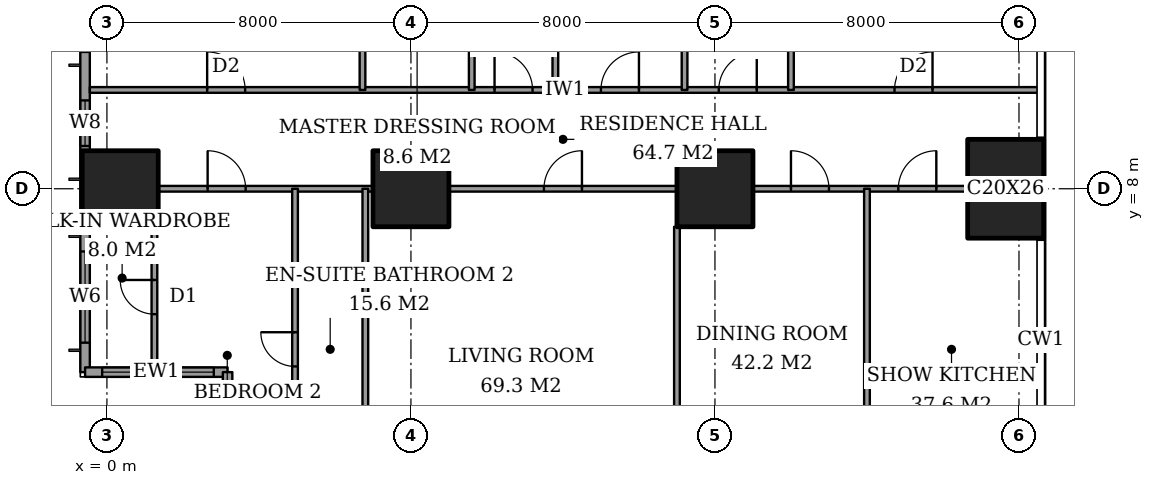
"""IFC4 building model, lengths in metres.
Left out: names, types, materials, properties, quantities, classifications, styles, units other than length and angle.
Written with IfcOpenShell. Run it as: python <this file> out.ifc"""

import sys

from ifc_helpers import new_model, si_unit, direction, frame, frame_2d, origin, origin_2d, place, context, subcontext, project, spatial, rectangle, extrude, element, fill, save


model = new_model("IFC4")
c1 = context("Model", 3, precision=1e-05, world=origin(), true_north=direction((0.0, 1.0)))
c2 = subcontext(c1, "Body", "Model", "MODEL_VIEW")
j1 = project(units=[si_unit("LENGTHUNIT", "METRE"), si_unit("PLANEANGLEUNIT", "RADIAN")], contexts=[c1])
p1 = place(None, origin())
s1 = spatial("IfcSite", under=j1, at=p1, CompositionType="ELEMENT")
p2 = place(p1, origin())
s2 = spatial("IfcBuilding", under=s1, at=p2, CompositionType="ELEMENT")
p3 = place(p2, frame((0.0, 0.0, 87.2)))
s3 = spatial("IfcBuildingStorey", under=s2, at=p3, CompositionType="ELEMENT", Elevation=87.2)
for number, where, z_axis, x_axis in (
    (1, (0.35, 8.0, 0.0), (0.0, 0.0, 1.0), (1.0, 0.0, 0.0)),
    (2, (8.0, 8.0, 0.0), (0.0, 0.0, 1.0), (1.0, 0.0, 0.0)),
    (3, (16.0, 8.0, 0.0), (0.0, 0.0, 1.0), (1.0, 0.0, 0.0)),
):
    element("IfcColumn", number, at=place(p3, frame(where, z_axis=z_axis, x_axis=x_axis)), inside=s3, PredefinedType="COLUMN", context=c2, shape_type="SweptSolid", body=[
        extrude(rectangle(XDim=2.0, YDim=2.0, at=origin_2d()), origin(), (0.0, 0.0, 1.0), 3.6),
    ])
p4 = place(p3, frame((23.65, 8.0, 0.0), z_axis=(0.0, 0.0, 1.0), x_axis=(1.0, 0.0, 0.0)))
e4 = element("IfcColumn", 4, at=p4, inside=s3, PredefinedType="COLUMN", context=c2, shape_type="SweptSolid", body=[
    extrude(rectangle(XDim=2.0, YDim=2.6, at=origin_2d()), origin(), (0.0, 0.0, 1.0), 3.6),
])
p5 = place(p3, frame((-0.575, 44.825, 0.0), z_axis=(0.0, 0.0, 1.0), x_axis=(0.0, -1.0, 0.0)))
e5 = element("IfcWall", 5, at=p5, inside=s3, PredefinedType="SOLIDWALL", context=c2, shape_type="SweptSolid", body=[
    extrude(rectangle(XDim=41.65, YDim=0.25, at=frame_2d((20.825, 0.0))), origin(), (0.0, 0.0, 1.0), 3.6),
])
p6 = place(p5, frame((0.775, 0.0, 0.6)))
e6 = element("IfcOpeningElement", 6, at=p6, cuts=e5, PredefinedType="OPENING", context=c2, shape_type="SweptSolid", body=[
    extrude(rectangle(XDim=2.4, YDim=2.0, at=frame_2d((1.2, 1.0))), frame((0.0, 0.135, 0.0), z_axis=(0.0, -1.0, 0.0), x_axis=(1.0, 0.0, 0.0)), (0.0, 0.0, 1.0), 0.27),
])
p7 = place(p5, frame((6.1, 0.0, 0.6)))
e7 = element("IfcOpeningElement", 7, at=p7, cuts=e5, PredefinedType="OPENING", context=c2, shape_type="SweptSolid", body=[
    extrude(rectangle(XDim=1.2, YDim=2.0, at=frame_2d((0.6, 1.0))), frame((0.0, 0.135, 0.0), z_axis=(0.0, -1.0, 0.0), x_axis=(1.0, 0.0, 0.0)), (0.0, 0.0, 1.0), 0.27),
])
p8 = place(p5, frame((8.425, 0.0, 0.6)))
e8 = element("IfcOpeningElement", 8, at=p8, cuts=e5, PredefinedType="OPENING", context=c2, shape_type="SweptSolid", body=[
    extrude(rectangle(XDim=2.4, YDim=2.0, at=frame_2d((1.2, 1.0))), frame((0.0, 0.135, 0.0), z_axis=(0.0, -1.0, 0.0), x_axis=(1.0, 0.0, 0.0)), (0.0, 0.0, 1.0), 0.27),
])
p9 = place(p5, frame((15.625, 0.0, 0.6)))
e9 = element("IfcOpeningElement", 9, at=p9, cuts=e5, PredefinedType="OPENING", context=c2, shape_type="SweptSolid", body=[
    extrude(rectangle(XDim=2.4, YDim=2.0, at=frame_2d((1.2, 1.0))), frame((0.0, 0.135, 0.0), z_axis=(0.0, -1.0, 0.0), x_axis=(1.0, 0.0, 0.0)), (0.0, 0.0, 1.0), 0.27),
])
p10 = place(p5, frame((23.625, 0.0, 0.6)))
e10 = element("IfcOpeningElement", 10, at=p10, cuts=e5, PredefinedType="OPENING", context=c2, shape_type="SweptSolid", body=[
    extrude(rectangle(XDim=2.4, YDim=2.0, at=frame_2d((1.2, 1.0))), frame((0.0, 0.135, 0.0), z_axis=(0.0, -1.0, 0.0), x_axis=(1.0, 0.0, 0.0)), (0.0, 0.0, 1.0), 0.27),
])
p11 = place(p5, frame((30.825, 0.0, 0.6)))
e11 = element("IfcOpeningElement", 11, at=p11, cuts=e5, PredefinedType="OPENING", context=c2, shape_type="SweptSolid", body=[
    extrude(rectangle(XDim=2.4, YDim=2.0, at=frame_2d((1.2, 1.0))), frame((0.0, 0.135, 0.0), z_axis=(0.0, -1.0, 0.0), x_axis=(1.0, 0.0, 0.0)), (0.0, 0.0, 1.0), 0.27),
])
p12 = place(p5, frame((34.5, 0.0, 0.6)))
e12 = element("IfcOpeningElement", 12, at=p12, cuts=e5, PredefinedType="OPENING", context=c2, shape_type="SweptSolid", body=[
    extrude(rectangle(XDim=1.2, YDim=2.0, at=frame_2d((0.6, 1.0))), frame((0.0, 0.135, 0.0), z_axis=(0.0, -1.0, 0.0), x_axis=(1.0, 0.0, 0.0)), (0.0, 0.0, 1.0), 0.27),
])
p13 = place(p5, frame((38.475, 0.0, 0.6)))
e13 = element("IfcOpeningElement", 13, at=p13, cuts=e5, PredefinedType="OPENING", context=c2, shape_type="SweptSolid", body=[
    extrude(rectangle(XDim=2.4, YDim=2.0, at=frame_2d((1.2, 1.0))), frame((0.0, 0.135, 0.0), z_axis=(0.0, -1.0, 0.0), x_axis=(1.0, 0.0, 0.0)), (0.0, 0.0, 1.0), 0.27),
])
p14 = place(p3, frame((-0.575, 3.175, 0.0), z_axis=(0.0, 0.0, 1.0), x_axis=(1.0, 0.0, 0.0)))
e14 = element("IfcWall", 14, at=p14, inside=s3, PredefinedType="SOLIDWALL", context=c2, shape_type="SweptSolid", body=[
    extrude(rectangle(XDim=3.75, YDim=0.25, at=frame_2d((1.875, 0.0))), origin(), (0.0, 0.0, 1.0), 3.6),
])
p15 = place(p14, frame((0.45, 0.0, 0.6)))
e15 = element("IfcOpeningElement", 15, at=p15, cuts=e14, PredefinedType="OPENING", context=c2, shape_type="SweptSolid", body=[
    extrude(rectangle(XDim=1.2, YDim=2.0, at=frame_2d((0.6, 1.0))), frame((0.0, 0.135, 0.0), z_axis=(0.0, -1.0, 0.0), x_axis=(1.0, 0.0, 0.0)), (0.0, 0.0, 1.0), 0.27),
])
p16 = place(p14, frame((2.188, 0.0, 0.6)))
e16 = element("IfcOpeningElement", 16, at=p16, cuts=e14, PredefinedType="OPENING", context=c2, shape_type="SweptSolid", body=[
    extrude(rectangle(XDim=1.2, YDim=2.0, at=frame_2d((0.6, 1.0))), frame((0.0, 0.135, 0.0), z_axis=(0.0, -1.0, 0.0), x_axis=(1.0, 0.0, 0.0)), (0.0, 0.0, 1.0), 0.27),
])
p17 = place(p3, frame((3.175, 3.175, 0.0), z_axis=(0.0, 0.0, 1.0), x_axis=(0.0, -1.0, 0.0)))
e17 = element("IfcWall", 17, at=p17, inside=s3, PredefinedType="SOLIDWALL", context=c2, shape_type="SweptSolid", body=[
    extrude(rectangle(XDim=3.75, YDim=0.25, at=frame_2d((1.875, 0.0))), origin(), (0.0, 0.0, 1.0), 3.6),
])
p18 = place(p17, frame((0.613, 0.0, 0.6)))
e18 = element("IfcOpeningElement", 18, at=p18, cuts=e17, PredefinedType="OPENING", context=c2, shape_type="SweptSolid", body=[
    extrude(rectangle(XDim=2.4, YDim=2.0, at=frame_2d((1.2, 1.0))), frame((0.0, 0.135, 0.0), z_axis=(0.0, -1.0, 0.0), x_axis=(1.0, 0.0, 0.0)), (0.0, 0.0, 1.0), 0.27),
])
p19 = place(p3, frame((1.35, 8.0, 0.0), z_axis=(0.0, 0.0, 1.0), x_axis=(1.0, 0.0, 0.0)))
e19 = element("IfcWall", 19, at=p19, inside=s3, PredefinedType="PARTITIONING", context=c2, shape_type="SweptSolid", body=[
    extrude(rectangle(XDim=5.65, YDim=0.15, at=frame_2d((2.825, 0.0))), origin(), (0.0, 0.0, 1.0), 3.25),
])
p20 = place(p19, frame((1.3, 0.0, 0.0)))
e20 = element("IfcOpeningElement", 20, at=p20, cuts=e19, PredefinedType="OPENING", context=c2, shape_type="SweptSolid", body=[
    extrude(rectangle(XDim=1.0, YDim=2.1, at=frame_2d((0.5, 1.05))), frame((0.0, 0.085, 0.0), z_axis=(0.0, -1.0, 0.0), x_axis=(1.0, 0.0, 0.0)), (0.0, 0.0, 1.0), 0.17),
])
p21 = place(p3, frame((9.0, 8.0, 0.0), z_axis=(0.0, 0.0, 1.0), x_axis=(1.0, 0.0, 0.0)))
e21 = element("IfcWall", 21, at=p21, inside=s3, PredefinedType="PARTITIONING", context=c2, shape_type="SweptSolid", body=[
    extrude(rectangle(XDim=6.0, YDim=0.15, at=frame_2d((3.0, 0.0))), origin(), (0.0, 0.0, 1.0), 3.25),
])
p22 = place(p21, frame((2.5, 0.0, 0.0)))
e22 = element("IfcOpeningElement", 22, at=p22, cuts=e21, PredefinedType="OPENING", context=c2, shape_type="SweptSolid", body=[
    extrude(rectangle(XDim=1.0, YDim=2.1, at=frame_2d((0.5, 1.05))), frame((0.0, 0.085, 0.0), z_axis=(0.0, -1.0, 0.0), x_axis=(1.0, 0.0, 0.0)), (0.0, 0.0, 1.0), 0.17),
])
p23 = place(p3, frame((17.0, 8.0, 0.0), z_axis=(0.0, 0.0, 1.0), x_axis=(1.0, 0.0, 0.0)))
e23 = element("IfcWall", 23, at=p23, inside=s3, PredefinedType="PARTITIONING", context=c2, shape_type="SweptSolid", body=[
    extrude(rectangle(XDim=5.65, YDim=0.15, at=frame_2d((2.825, 0.0))), origin(), (0.0, 0.0, 1.0), 3.25),
])
p24 = place(p23, frame((1.0, 0.0, 0.0)))
e24 = element("IfcOpeningElement", 24, at=p24, cuts=e23, PredefinedType="OPENING", context=c2, shape_type="SweptSolid", body=[
    extrude(rectangle(XDim=1.0, YDim=2.1, at=frame_2d((0.5, 1.05))), frame((0.0, 0.085, 0.0), z_axis=(0.0, -1.0, 0.0), x_axis=(1.0, 0.0, 0.0)), (0.0, 0.0, 1.0), 0.17),
])
p25 = place(p23, frame((3.825, 0.0, 0.0)))
e25 = element("IfcOpeningElement", 25, at=p25, cuts=e23, PredefinedType="OPENING", context=c2, shape_type="SweptSolid", body=[
    extrude(rectangle(XDim=1.0, YDim=2.1, at=frame_2d((0.5, 1.05))), frame((0.0, 0.085, 0.0), z_axis=(0.0, -1.0, 0.0), x_axis=(1.0, 0.0, 0.0)), (0.0, 0.0, 1.0), 0.17),
])
p26 = place(p3, frame((-0.45, 10.6, 0.0), z_axis=(0.0, 0.0, 1.0), x_axis=(1.0, 0.0, 0.0)))
e26 = element("IfcWall", 26, at=p26, inside=s3, PredefinedType="PARTITIONING", context=c2, shape_type="SweptSolid", body=[
    extrude(rectangle(XDim=25.011, YDim=0.15, at=frame_2d((12.505, 0.0))), origin(), (0.0, 0.0, 1.0), 3.25),
])
p27 = place(p26, frame((10.65, 0.0, 0.0)))
e27 = element("IfcOpeningElement", 27, at=p27, cuts=e26, PredefinedType="OPENING", context=c2, shape_type="SweptSolid", body=[
    extrude(rectangle(XDim=1.0, YDim=2.1, at=frame_2d((0.5, 1.05))), frame((0.0, 0.085, 0.0), z_axis=(0.0, -1.0, 0.0), x_axis=(1.0, 0.0, 0.0)), (0.0, 0.0, 1.0), 0.17),
])
p28 = place(p26, frame((3.087, 0.0, 0.0)))
e28 = element("IfcOpeningElement", 28, at=p28, cuts=e26, PredefinedType="OPENING", context=c2, shape_type="SweptSolid", body=[
    extrude(rectangle(XDim=1.0, YDim=2.1, at=frame_2d((0.5, 1.05))), frame((0.0, 0.085, 0.0), z_axis=(0.0, -1.0, 0.0), x_axis=(1.0, 0.0, 0.0)), (0.0, 0.0, 1.0), 0.17),
])
p29 = place(p26, frame((13.45, 0.0, 0.0)))
e29 = element("IfcOpeningElement", 29, at=p29, cuts=e26, PredefinedType="OPENING", context=c2, shape_type="SweptSolid", body=[
    extrude(rectangle(XDim=1.0, YDim=2.1, at=frame_2d((0.5, 1.05))), frame((0.0, 0.085, 0.0), z_axis=(0.0, -1.0, 0.0), x_axis=(1.0, 0.0, 0.0)), (0.0, 0.0, 1.0), 0.17),
])
p30 = place(p26, frame((16.55, 0.0, 0.0)))
e30 = element("IfcOpeningElement", 30, at=p30, cuts=e26, PredefinedType="OPENING", context=c2, shape_type="SweptSolid", body=[
    extrude(rectangle(XDim=1.0, YDim=2.1, at=frame_2d((0.5, 1.05))), frame((0.0, 0.085, 0.0), z_axis=(0.0, -1.0, 0.0), x_axis=(1.0, 0.0, 0.0)), (0.0, 0.0, 1.0), 0.17),
])
p31 = place(p26, frame((21.175, 0.0, 0.0)))
e31 = element("IfcOpeningElement", 31, at=p31, cuts=e26, PredefinedType="OPENING", context=c2, shape_type="SweptSolid", body=[
    extrude(rectangle(XDim=1.0, YDim=2.1, at=frame_2d((0.5, 1.05))), frame((0.0, 0.085, 0.0), z_axis=(0.0, -1.0, 0.0), x_axis=(1.0, 0.0, 0.0)), (0.0, 0.0, 1.0), 0.17),
])
p32 = place(p3, frame((1.25, 3.3, 0.0), z_axis=(0.0, 0.0, 1.0), x_axis=(0.0, 1.0, 0.0)))
e32 = element("IfcWall", 32, at=p32, inside=s3, PredefinedType="PARTITIONING", context=c2, shape_type="SweptSolid", body=[
    extrude(rectangle(XDim=3.7, YDim=0.15, at=frame_2d((1.85, 0.0))), origin(), (0.0, 0.0, 1.0), 3.25),
])
p33 = place(p32, frame((1.4, 0.0, 0.0)))
e33 = element("IfcOpeningElement", 33, at=p33, cuts=e32, PredefinedType="OPENING", context=c2, shape_type="SweptSolid", body=[
    extrude(rectangle(XDim=0.9, YDim=2.1, at=frame_2d((0.45, 1.05))), frame((0.0, 0.085, 0.0), z_axis=(0.0, -1.0, 0.0), x_axis=(1.0, 0.0, 0.0)), (0.0, 0.0, 1.0), 0.17),
])
p34 = place(p3, frame((4.95, -0.45, 0.0), z_axis=(0.0, 0.0, 1.0), x_axis=(0.0, 1.0, 0.0)))
e34 = element("IfcWall", 34, at=p34, inside=s3, PredefinedType="PARTITIONING", context=c2, shape_type="SweptSolid", body=[
    extrude(rectangle(XDim=8.45, YDim=0.15, at=frame_2d((4.225, 0.0))), origin(), (0.0, 0.0, 1.0), 3.25),
])
p35 = place(p34, frame((3.775, 0.0, 0.0)))
e35 = element("IfcOpeningElement", 35, at=p35, cuts=e34, PredefinedType="OPENING", context=c2, shape_type="SweptSolid", body=[
    extrude(rectangle(XDim=0.9, YDim=2.1, at=frame_2d((0.45, 1.05))), frame((0.0, 0.085, 0.0), z_axis=(0.0, -1.0, 0.0), x_axis=(1.0, 0.0, 0.0)), (0.0, 0.0, 1.0), 0.17),
])
p36 = place(p3, frame((6.725, 10.6, 0.0), z_axis=(0.0, 0.0, 1.0), x_axis=(0.0, 1.0, 0.0)))
e36 = element("IfcWall", 36, at=p36, inside=s3, PredefinedType="PARTITIONING", context=c2, shape_type="SweptSolid", body=[
    extrude(rectangle(XDim=4.2, YDim=0.15, at=frame_2d((2.1, 0.0))), origin(), (0.0, 0.0, 1.0), 3.25),
])
p37 = place(p36, frame((1.05, 0.0, 0.0)))
e37 = element("IfcOpeningElement", 37, at=p37, cuts=e36, PredefinedType="OPENING", context=c2, shape_type="SweptSolid", body=[
    extrude(rectangle(XDim=0.9, YDim=2.1, at=frame_2d((0.45, 1.05))), frame((0.0, 0.085, 0.0), z_axis=(0.0, -1.0, 0.0), x_axis=(1.0, 0.0, 0.0)), (0.0, 0.0, 1.0), 0.17),
])
p38 = place(p3, frame((6.8, -0.45, 0.0), z_axis=(0.0, 0.0, 1.0), x_axis=(0.0, 1.0, 0.0)))
e38 = element("IfcWall", 38, at=p38, inside=s3, PredefinedType="PARTITIONING", context=c2, shape_type="SweptSolid", body=[
    extrude(rectangle(XDim=8.45, YDim=0.15, at=frame_2d((4.225, 0.0))), origin(), (0.0, 0.0, 1.0), 3.25),
])
p39 = place(p3, frame((9.6, 10.6, 0.0), z_axis=(0.0, 0.0, 1.0), x_axis=(0.0, 1.0, 0.0)))
e39 = element("IfcWall", 39, at=p39, inside=s3, PredefinedType="PARTITIONING", context=c2, shape_type="SweptSolid", body=[
    extrude(rectangle(XDim=11.0, YDim=0.15, at=frame_2d((5.5, 0.0))), origin(), (0.0, 0.0, 1.0), 3.25),
])
p40 = place(p39, frame((7.7, 0.0, 0.0)))
e40 = element("IfcOpeningElement", 40, at=p40, cuts=e39, PredefinedType="OPENING", context=c2, shape_type="SweptSolid", body=[
    extrude(rectangle(XDim=1.0, YDim=2.1, at=frame_2d((0.5, 1.05))), frame((0.0, 0.085, 0.0), z_axis=(0.0, -1.0, 0.0), x_axis=(1.0, 0.0, 0.0)), (0.0, 0.0, 1.0), 0.17),
])
p41 = place(p3, frame((11.8, 10.6, 0.0), z_axis=(0.0, 0.0, 1.0), x_axis=(0.0, 1.0, 0.0)))
e41 = element("IfcWall", 41, at=p41, inside=s3, PredefinedType="PARTITIONING", context=c2, shape_type="SweptSolid", body=[
    extrude(rectangle(XDim=5.4, YDim=0.15, at=frame_2d((2.7, 0.0))), origin(), (0.0, 0.0, 1.0), 3.25),
])
p42 = place(p3, frame((15.0, 1.35, 0.0), z_axis=(0.0, 0.0, 1.0), x_axis=(0.0, 1.0, 0.0)))
e42 = element("IfcWall", 42, at=p42, inside=s3, PredefinedType="PARTITIONING", context=c2, shape_type="SweptSolid", body=[
    extrude(rectangle(XDim=5.65, YDim=0.15, at=frame_2d((2.825, 0.0))), origin(), (0.0, 0.0, 1.0), 3.25),
])
p43 = place(p3, frame((15.2, 10.6, 0.0), z_axis=(0.0, 0.0, 1.0), x_axis=(0.0, 1.0, 0.0)))
e43 = element("IfcWall", 43, at=p43, inside=s3, PredefinedType="PARTITIONING", context=c2, shape_type="SweptSolid", body=[
    extrude(rectangle(XDim=4.2, YDim=0.15, at=frame_2d((2.1, 0.0))), origin(), (0.0, 0.0, 1.0), 3.25),
])
p44 = place(p3, frame((18.0, 10.6, 0.0), z_axis=(0.0, 0.0, 1.0), x_axis=(0.0, 1.0, 0.0)))
e44 = element("IfcWall", 44, at=p44, inside=s3, PredefinedType="PARTITIONING", context=c2, shape_type="SweptSolid", body=[
    extrude(rectangle(XDim=13.4, YDim=0.15, at=frame_2d((6.7, 0.0))), origin(), (0.0, 0.0, 1.0), 3.25),
])
p45 = place(p44, frame((10.8, 0.0, 0.0)))
e45 = element("IfcOpeningElement", 45, at=p45, cuts=e44, PredefinedType="OPENING", context=c2, shape_type="SweptSolid", body=[
    extrude(rectangle(XDim=1.2, YDim=2.4, at=frame_2d((0.6, 1.2))), frame((0.0, 0.085, 0.0), z_axis=(0.0, -1.0, 0.0), x_axis=(1.0, 0.0, 0.0)), (0.0, 0.0, 1.0), 0.17),
])
p46 = place(p44, frame((7.25, 0.0, 0.0)))
e46 = element("IfcOpeningElement", 46, at=p46, cuts=e44, PredefinedType="OPENING", context=c2, shape_type="SweptSolid", body=[
    extrude(rectangle(XDim=0.9, YDim=2.1, at=frame_2d((0.45, 1.05))), frame((0.0, 0.085, 0.0), z_axis=(0.0, -1.0, 0.0), x_axis=(1.0, 0.0, 0.0)), (0.0, 0.0, 1.0), 0.17),
])
p47 = place(p3, frame((20.0, -0.45, 0.0), z_axis=(0.0, 0.0, 1.0), x_axis=(0.0, 1.0, 0.0)))
e47 = element("IfcWall", 47, at=p47, inside=s3, PredefinedType="PARTITIONING", context=c2, shape_type="SweptSolid", body=[
    extrude(rectangle(XDim=8.45, YDim=0.15, at=frame_2d((4.225, 0.0))), origin(), (0.0, 0.0, 1.0), 3.25),
])
p48 = place(p12, origin())
e48 = element("IfcWindow", 48, at=p48, inside=s3, PartitioningType="SINGLE_PANEL", PredefinedType="WINDOW", context=c2, shape_type="SweptSolid", body=[
    extrude(rectangle(XDim=1.2, YDim=2.0, at=frame_2d((0.6, 1.0))), frame((0.0, 0.03, 0.0), z_axis=(0.0, -1.0, 0.0), x_axis=(1.0, 0.0, 0.0)), (0.0, 0.0, 1.0), 0.06),
])
fill(e12, e48)
p49 = place(p13, origin())
e49 = element("IfcWindow", 49, at=p49, inside=s3, PartitioningType="SINGLE_PANEL", PredefinedType="WINDOW", context=c2, shape_type="SweptSolid", body=[
    extrude(rectangle(XDim=2.4, YDim=2.0, at=frame_2d((1.2, 1.0))), frame((0.0, 0.03, 0.0), z_axis=(0.0, -1.0, 0.0), x_axis=(1.0, 0.0, 0.0)), (0.0, 0.0, 1.0), 0.06),
])
fill(e13, e49)
p50 = place(p15, origin())
e50 = element("IfcWindow", 50, at=p50, inside=s3, PartitioningType="SINGLE_PANEL", PredefinedType="WINDOW", context=c2, shape_type="SweptSolid", body=[
    extrude(rectangle(XDim=1.2, YDim=2.0, at=frame_2d((0.6, 1.0))), frame((0.0, 0.03, 0.0), z_axis=(0.0, -1.0, 0.0), x_axis=(1.0, 0.0, 0.0)), (0.0, 0.0, 1.0), 0.06),
])
fill(e15, e50)
p51 = place(p16, origin())
e51 = element("IfcWindow", 51, at=p51, inside=s3, PartitioningType="SINGLE_PANEL", PredefinedType="WINDOW", context=c2, shape_type="SweptSolid", body=[
    extrude(rectangle(XDim=1.2, YDim=2.0, at=frame_2d((0.6, 1.0))), frame((0.0, 0.03, 0.0), z_axis=(0.0, -1.0, 0.0), x_axis=(1.0, 0.0, 0.0)), (0.0, 0.0, 1.0), 0.06),
])
fill(e16, e51)
p52 = place(p18, origin())
e52 = element("IfcWindow", 52, at=p52, inside=s3, PartitioningType="SINGLE_PANEL", PredefinedType="WINDOW", context=c2, shape_type="SweptSolid", body=[
    extrude(rectangle(XDim=2.4, YDim=2.0, at=frame_2d((1.2, 1.0))), frame((0.0, 0.03, 0.0), z_axis=(0.0, -1.0, 0.0), x_axis=(1.0, 0.0, 0.0)), (0.0, 0.0, 1.0), 0.06),
])
fill(e18, e52)
p53 = place(p33, origin())
e53 = element("IfcDoor", 53, at=p53, inside=s3, OperationType="SINGLE_SWING_LEFT", PredefinedType="DOOR", context=c2, shape_type="SweptSolid", body=[
    extrude(rectangle(XDim=0.9, YDim=2.1, at=frame_2d((0.45, 1.05))), frame((0.0, 0.025, 0.0), z_axis=(0.0, -1.0, 0.0), x_axis=(1.0, 0.0, 0.0)), (0.0, 0.0, 1.0), 0.05),
])
fill(e33, e53)
p54 = place(p20, origin())
e54 = element("IfcDoor", 54, at=p54, inside=s3, OperationType="SINGLE_SWING_RIGHT", PredefinedType="DOOR", context=c2, shape_type="SweptSolid", body=[
    extrude(rectangle(XDim=1.0, YDim=2.1, at=frame_2d((0.5, 1.05))), frame((0.0, 0.025, 0.0), z_axis=(0.0, -1.0, 0.0), x_axis=(1.0, 0.0, 0.0)), (0.0, 0.0, 1.0), 0.05),
])
fill(e20, e54)
p55 = place(p35, origin())
e55 = element("IfcDoor", 55, at=p55, inside=s3, OperationType="SINGLE_SWING_LEFT", PredefinedType="DOOR", context=c2, shape_type="SweptSolid", body=[
    extrude(rectangle(XDim=0.9, YDim=2.1, at=frame_2d((0.45, 1.05))), frame((0.0, 0.025, 0.0), z_axis=(0.0, -1.0, 0.0), x_axis=(1.0, 0.0, 0.0)), (0.0, 0.0, 1.0), 0.05),
])
fill(e35, e55)
p56 = place(p22, origin())
e56 = element("IfcDoor", 56, at=p56, inside=s3, OperationType="SINGLE_SWING_LEFT", PredefinedType="DOOR", context=c2, shape_type="SweptSolid", body=[
    extrude(rectangle(XDim=1.0, YDim=2.1, at=frame_2d((0.5, 1.05))), frame((0.0, 0.025, 0.0), z_axis=(0.0, -1.0, 0.0), x_axis=(1.0, 0.0, 0.0)), (0.0, 0.0, 1.0), 0.05),
])
fill(e22, e56)
p57 = place(p24, origin())
e57 = element("IfcDoor", 57, at=p57, inside=s3, OperationType="SINGLE_SWING_RIGHT", PredefinedType="DOOR", context=c2, shape_type="SweptSolid", body=[
    extrude(rectangle(XDim=1.0, YDim=2.1, at=frame_2d((0.5, 1.05))), frame((0.0, 0.025, 0.0), z_axis=(0.0, -1.0, 0.0), x_axis=(1.0, 0.0, 0.0)), (0.0, 0.0, 1.0), 0.05),
])
fill(e24, e57)
p58 = place(p25, origin())
e58 = element("IfcDoor", 58, at=p58, inside=s3, OperationType="SINGLE_SWING_LEFT", PredefinedType="DOOR", context=c2, shape_type="SweptSolid", body=[
    extrude(rectangle(XDim=1.0, YDim=2.1, at=frame_2d((0.5, 1.05))), frame((0.0, 0.025, 0.0), z_axis=(0.0, -1.0, 0.0), x_axis=(1.0, 0.0, 0.0)), (0.0, 0.0, 1.0), 0.05),
])
fill(e25, e58)
p59 = place(p27, origin())
e59 = element("IfcDoor", 59, at=p59, inside=s3, OperationType="SINGLE_SWING_RIGHT", PredefinedType="DOOR", context=c2, shape_type="SweptSolid", body=[
    extrude(rectangle(XDim=1.0, YDim=2.1, at=frame_2d((0.5, 1.05))), frame((0.0, 0.025, 0.0), z_axis=(0.0, -1.0, 0.0), x_axis=(1.0, 0.0, 0.0)), (0.0, 0.0, 1.0), 0.05),
])
fill(e27, e59)
p60 = place(p28, origin())
e60 = element("IfcDoor", 60, at=p60, inside=s3, OperationType="SINGLE_SWING_RIGHT", PredefinedType="DOOR", context=c2, shape_type="SweptSolid", body=[
    extrude(rectangle(XDim=1.0, YDim=2.1, at=frame_2d((0.5, 1.05))), frame((0.0, 0.025, 0.0), z_axis=(0.0, -1.0, 0.0), x_axis=(1.0, 0.0, 0.0)), (0.0, 0.0, 1.0), 0.05),
])
fill(e28, e60)
p61 = place(p29, origin())
e61 = element("IfcDoor", 61, at=p61, inside=s3, OperationType="SINGLE_SWING_LEFT", PredefinedType="DOOR", context=c2, shape_type="SweptSolid", body=[
    extrude(rectangle(XDim=1.0, YDim=2.1, at=frame_2d((0.5, 1.05))), frame((0.0, 0.025, 0.0), z_axis=(0.0, -1.0, 0.0), x_axis=(1.0, 0.0, 0.0)), (0.0, 0.0, 1.0), 0.05),
])
fill(e29, e61)
p62 = place(p30, origin())
e62 = element("IfcDoor", 62, at=p62, inside=s3, OperationType="SINGLE_SWING_LEFT", PredefinedType="DOOR", context=c2, shape_type="SweptSolid", body=[
    extrude(rectangle(XDim=1.0, YDim=2.1, at=frame_2d((0.5, 1.05))), frame((0.0, 0.025, 0.0), z_axis=(0.0, -1.0, 0.0), x_axis=(1.0, 0.0, 0.0)), (0.0, 0.0, 1.0), 0.05),
])
fill(e30, e62)
p63 = place(p31, origin())
e63 = element("IfcDoor", 63, at=p63, inside=s3, OperationType="SINGLE_SWING_LEFT", PredefinedType="DOOR", context=c2, shape_type="SweptSolid", body=[
    extrude(rectangle(XDim=1.0, YDim=2.1, at=frame_2d((0.5, 1.05))), frame((0.0, 0.025, 0.0), z_axis=(0.0, -1.0, 0.0), x_axis=(1.0, 0.0, 0.0)), (0.0, 0.0, 1.0), 0.05),
])
fill(e31, e63)
save(model, sys.argv[1])
